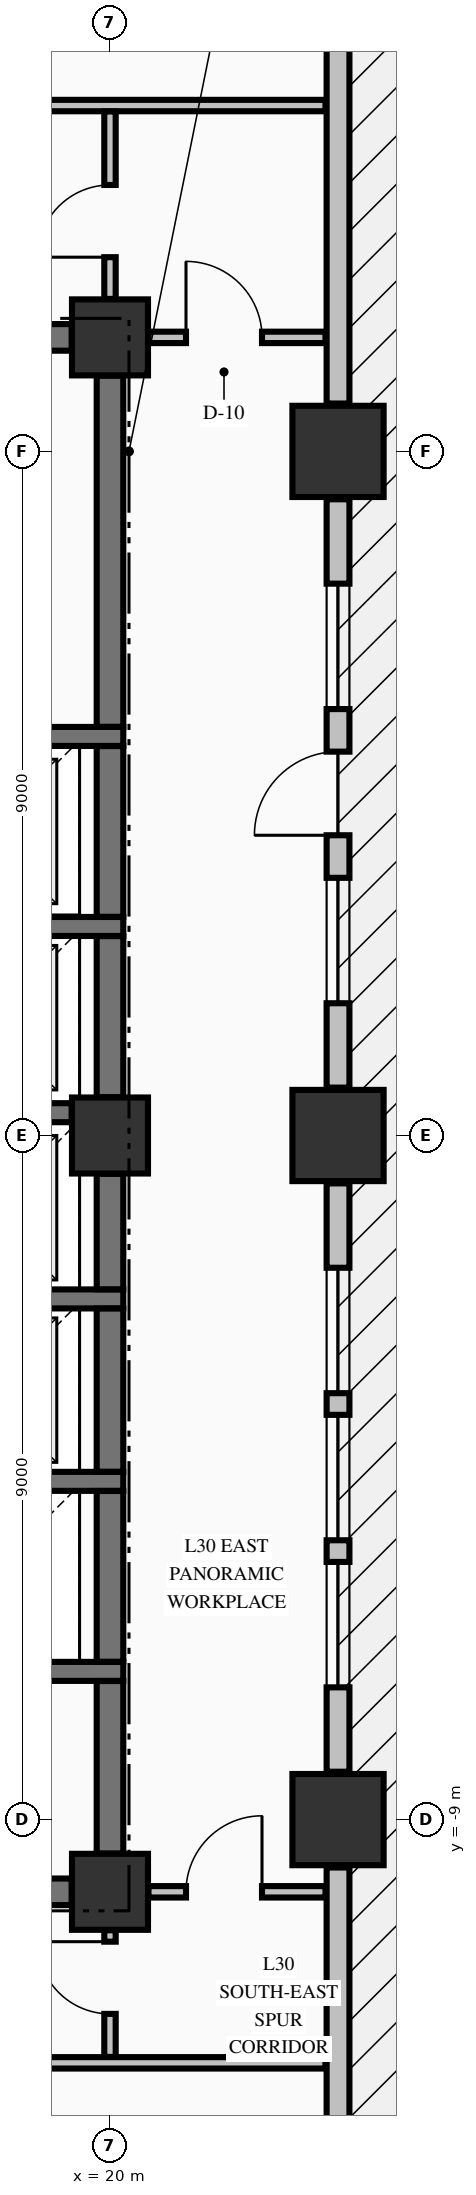
"""IFC4 building model, lengths in metres.
Left out: names, types, materials, properties, quantities, classifications, styles, units other than length and angle.
Written with IfcOpenShell. Run it as: python <this file> out.ifc"""

import sys

from ifc_helpers import new_model, si_unit, direction, frame, frame_2d, origin, origin_2d, place, context, subcontext, project, spatial, rectangle, extrude, element, fill, save


model = new_model("IFC4")
c1 = context("Model", 3, precision=1e-05, world=origin(), true_north=direction((0.0, 1.0)))
c2 = subcontext(c1, "Body", "Model", "MODEL_VIEW")
j1 = project(units=[si_unit("LENGTHUNIT", "METRE"), si_unit("PLANEANGLEUNIT", "RADIAN")], contexts=[c1])
p1 = place(None, origin())
s1 = spatial("IfcSite", under=j1, at=p1, CompositionType="ELEMENT")
p2 = place(p1, origin())
s2 = spatial("IfcBuilding", under=s1, at=p2, CompositionType="ELEMENT")
p3 = place(p2, frame((0.0, 0.0, 121.35)))
s3 = spatial("IfcBuildingStorey", under=s2, at=p3, CompositionType="ELEMENT", Elevation=121.35)
for number, where, z_axis, x_axis in (
    (1, (23.0, -9.0, -0.425), (0.0, 0.0, 1.0), (1.0, 0.0, 0.0)),
    (2, (23.0, 0.0, -0.425), (0.0, 0.0, 1.0), (1.0, 0.0, 0.0)),
    (3, (23.0, 9.0, -0.425), (0.0, 0.0, 1.0), (1.0, 0.0, 0.0)),
):
    element("IfcColumn", number, at=place(p3, frame(where, z_axis=z_axis, x_axis=x_axis)), inside=s3, PredefinedType="COLUMN", context=c2, shape_type="SweptSolid", body=[
        extrude(rectangle(XDim=1.2, YDim=1.2, at=origin_2d()), origin(), (0.0, 0.0, 1.0), 3.745),
    ])
for number, where, z_axis, x_axis in (
    (4, (20.0, -9.95, -0.425), (0.0, 0.0, 1.0), (1.0, 0.0, 0.0)),
    (5, (20.0, 10.5, -0.425), (0.0, 0.0, 1.0), (1.0, 0.0, 0.0)),
    (6, (20.0, 0.0, -0.425), (0.0, 0.0, 1.0), (1.0, 0.0, 0.0)),
):
    element("IfcColumn", number, at=place(p3, frame(where, z_axis=z_axis, x_axis=x_axis)), inside=s3, PredefinedType="COLUMN", context=c2, shape_type="SweptSolid", body=[
        extrude(rectangle(XDim=1.0, YDim=1.0, at=origin_2d()), origin(), (0.0, 0.0, 1.0), 3.745),
    ])
p4 = place(p3, frame((23.0, -20.37, 0.0), z_axis=(0.0, 0.0, 1.0), x_axis=(0.0, 1.0, 0.0)))
e7 = element("IfcWall", 7, at=p4, inside=s3, PredefinedType="STANDARD", context=c2, shape_type="SweptSolid", body=[
    extrude(rectangle(XDim=10.74, YDim=0.3, at=frame_2d((5.37, 0.0))), origin(), (0.0, 0.0, 1.0), 2.712),
])
p5 = place(p3, frame((23.0, -8.37, 0.0), z_axis=(0.0, 0.0, 1.0), x_axis=(0.0, 1.0, 0.0)))
e8 = element("IfcWall", 8, at=p5, inside=s3, PredefinedType="STANDARD", context=c2, shape_type="SweptSolid", body=[
    extrude(rectangle(XDim=7.74, YDim=0.3, at=frame_2d((3.87, 0.0))), origin(), (0.0, 0.0, 1.0), 2.712),
])
p6 = place(p5, frame((1.11, 0.0, 0.8)))
e9 = element("IfcOpeningElement", 9, at=p6, cuts=e8, PredefinedType="OPENING", context=c2, shape_type="SweptSolid", body=[
    extrude(rectangle(XDim=1.65, YDim=1.7, at=frame_2d((0.825, 0.85))), frame((0.0, 0.16, 0.0), z_axis=(0.0, -1.0, 0.0), x_axis=(1.0, 0.0, 0.0)), (0.0, 0.0, 1.0), 0.32),
])
p7 = place(p5, frame((3.045, 0.0, 0.8)))
e10 = element("IfcOpeningElement", 10, at=p7, cuts=e8, PredefinedType="OPENING", context=c2, shape_type="SweptSolid", body=[
    extrude(rectangle(XDim=1.65, YDim=1.7, at=frame_2d((0.825, 0.85))), frame((0.0, 0.16, 0.0), z_axis=(0.0, -1.0, 0.0), x_axis=(1.0, 0.0, 0.0)), (0.0, 0.0, 1.0), 0.32),
])
p8 = place(p5, frame((4.98, 0.0, 0.8)))
e11 = element("IfcOpeningElement", 11, at=p8, cuts=e8, PredefinedType="OPENING", context=c2, shape_type="SweptSolid", body=[
    extrude(rectangle(XDim=1.65, YDim=1.7, at=frame_2d((0.825, 0.85))), frame((0.0, 0.16, 0.0), z_axis=(0.0, -1.0, 0.0), x_axis=(1.0, 0.0, 0.0)), (0.0, 0.0, 1.0), 0.32),
])
p9 = place(p3, frame((23.0, 0.63, 0.0), z_axis=(0.0, 0.0, 1.0), x_axis=(0.0, 1.0, 0.0)))
e12 = element("IfcWall", 12, at=p9, inside=s3, PredefinedType="STANDARD", context=c2, shape_type="SweptSolid", body=[
    extrude(rectangle(XDim=7.74, YDim=0.3, at=frame_2d((3.87, 0.0))), origin(), (0.0, 0.0, 1.0), 2.712),
])
p10 = place(p9, frame((3.32, 0.0, 0.0)))
e13 = element("IfcOpeningElement", 13, at=p10, cuts=e12, PredefinedType="OPENING", context=c2, shape_type="SweptSolid", body=[
    extrude(rectangle(XDim=1.1, YDim=2.15, at=frame_2d((0.55, 1.075))), frame((0.0, 0.16, 0.0), z_axis=(0.0, -1.0, 0.0), x_axis=(1.0, 0.0, 0.0)), (0.0, 0.0, 1.0), 0.32),
])
p11 = place(p9, frame((1.11, 0.0, 0.8)))
e14 = element("IfcOpeningElement", 14, at=p11, cuts=e12, PredefinedType="OPENING", context=c2, shape_type="SweptSolid", body=[
    extrude(rectangle(XDim=1.65, YDim=1.7, at=frame_2d((0.825, 0.85))), frame((0.0, 0.16, 0.0), z_axis=(0.0, -1.0, 0.0), x_axis=(1.0, 0.0, 0.0)), (0.0, 0.0, 1.0), 0.32),
])
p12 = place(p9, frame((4.98, 0.0, 0.8)))
e15 = element("IfcOpeningElement", 15, at=p12, cuts=e12, PredefinedType="OPENING", context=c2, shape_type="SweptSolid", body=[
    extrude(rectangle(XDim=1.65, YDim=1.7, at=frame_2d((0.825, 0.85))), frame((0.0, 0.16, 0.0), z_axis=(0.0, -1.0, 0.0), x_axis=(1.0, 0.0, 0.0)), (0.0, 0.0, 1.0), 0.32),
])
p13 = place(p3, frame((23.0, 9.63, 0.0), z_axis=(0.0, 0.0, 1.0), x_axis=(0.0, 1.0, 0.0)))
e16 = element("IfcWall", 16, at=p13, inside=s3, PredefinedType="STANDARD", context=c2, shape_type="SweptSolid", body=[
    extrude(rectangle(XDim=10.74, YDim=0.3, at=frame_2d((5.37, 0.0))), origin(), (0.0, 0.0, 1.0), 2.712),
])
p14 = place(p3, frame((14.7, -9.95, 0.0), z_axis=(0.0, 0.0, 1.0), x_axis=(1.0, 0.0, 0.0)))
e17 = element("IfcWall", 17, at=p14, inside=s3, PredefinedType="SHEAR", context=c2, shape_type="SweptSolid", body=[
    extrude(rectangle(XDim=4.796, YDim=0.35, at=frame_2d((2.398, 0.0))), origin(), (0.0, 0.0, 1.0), 3.32),
])
p15 = place(p14, frame((0.65, 0.0, 0.0)))
e18 = element("IfcOpeningElement", 18, at=p15, cuts=e17, PredefinedType="OPENING", context=c2, shape_type="SweptSolid", body=[
    extrude(rectangle(XDim=1.2, YDim=2.15, at=frame_2d((0.6, 1.075))), frame((0.0, 0.185, 0.0), z_axis=(0.0, -1.0, 0.0), x_axis=(1.0, 0.0, 0.0)), (0.0, 0.0, 1.0), 0.37),
])
for number, where, z_axis, x_axis in (
    (19, (17.025, -7.05, 0.0), (0.0, 0.0, 1.0), (1.0, 0.0, 0.0)),
    (20, (17.025, -4.55, 0.0), (0.0, 0.0, 1.0), (1.0, 0.0, 0.0)),
    (21, (17.025, -2.15, 0.0), (0.0, 0.0, 1.0), (1.0, 0.0, 0.0)),
):
    element("IfcWall", number, at=place(p3, frame(where, z_axis=z_axis, x_axis=x_axis)), inside=s3, PredefinedType="SOLIDWALL", context=c2, shape_type="SweptSolid", body=[
        extrude(rectangle(XDim=3.15, YDim=0.25, at=frame_2d((1.575, 0.0))), origin(), (0.0, 0.0, 1.0), 3.32),
    ])
p16 = place(p3, frame((17.025, 0.3, 0.0), z_axis=(0.0, 0.0, 1.0), x_axis=(1.0, 0.0, 0.0)))
e22 = element("IfcWall", 22, at=p16, inside=s3, PredefinedType="SOLIDWALL", context=c2, shape_type="SweptSolid", body=[
    extrude(rectangle(XDim=2.471, YDim=0.25, at=frame_2d((1.236, 0.0))), origin(), (0.0, 0.0, 1.0), 3.32),
])
for number, where, z_axis, x_axis in (
    (23, (17.025, 2.75, 0.0), (0.0, 0.0, 1.0), (1.0, 0.0, 0.0)),
    (24, (17.025, 5.25, 0.0), (0.0, 0.0, 1.0), (1.0, 0.0, 0.0)),
):
    element("IfcWall", number, at=place(p3, frame(where, z_axis=z_axis, x_axis=x_axis)), inside=s3, PredefinedType="SOLIDWALL", context=c2, shape_type="SweptSolid", body=[
        extrude(rectangle(XDim=3.15, YDim=0.25, at=frame_2d((1.575, 0.0))), origin(), (0.0, 0.0, 1.0), 3.32),
    ])
p17 = place(p3, frame((14.7, 10.5, 0.0), z_axis=(0.0, 0.0, 1.0), x_axis=(1.0, 0.0, 0.0)))
e25 = element("IfcWall", 25, at=p17, inside=s3, PredefinedType="SHEAR", context=c2, shape_type="SweptSolid", body=[
    extrude(rectangle(XDim=4.796, YDim=0.35, at=frame_2d((2.398, 0.0))), origin(), (0.0, 0.0, 1.0), 3.32),
])
p18 = place(p17, frame((0.65, 0.0, 0.0)))
e26 = element("IfcOpeningElement", 26, at=p18, cuts=e25, PredefinedType="OPENING", context=c2, shape_type="SweptSolid", body=[
    extrude(rectangle(XDim=1.2, YDim=2.15, at=frame_2d((0.6, 1.075))), frame((0.0, 0.185, 0.0), z_axis=(0.0, -1.0, 0.0), x_axis=(1.0, 0.0, 0.0)), (0.0, 0.0, 1.0), 0.37),
])
p19 = place(p17, frame((3.25, 0.0, 0.0)))
e27 = element("IfcOpeningElement", 27, at=p19, cuts=e25, PredefinedType="OPENING", context=c2, shape_type="SweptSolid", body=[
    extrude(rectangle(XDim=0.9, YDim=2.15, at=frame_2d((0.45, 1.075))), frame((0.0, 0.185, 0.0), z_axis=(0.0, -1.0, 0.0), x_axis=(1.0, 0.0, 0.0)), (0.0, 0.0, 1.0), 0.37),
])
p20 = place(p3, frame((-27.835, -12.2, 0.0), z_axis=(0.0, 0.0, 1.0), x_axis=(1.0, 0.0, 0.0)))
e28 = element("IfcWall", 28, at=p20, inside=s3, PredefinedType="PARTITIONING", context=c2, shape_type="SweptSolid", body=[
    extrude(rectangle(XDim=50.67, YDim=0.15, at=frame_2d((25.335, 0.0))), origin(), (0.0, 0.0, 1.0), 3.32),
])
p21 = place(p20, frame((13.13, 0.0, 0.0)))
e29 = element("IfcOpeningElement", 29, at=p21, cuts=e28, PredefinedType="OPENING", context=c2, shape_type="SweptSolid", body=[
    extrude(rectangle(XDim=1.05, YDim=2.15, at=frame_2d((0.525, 1.075))), frame((0.0, 0.085, 0.0), z_axis=(0.0, -1.0, 0.0), x_axis=(1.0, 0.0, 0.0)), (0.0, 0.0, 1.0), 0.17),
])
p22 = place(p20, frame((24.26, 0.0, 0.0)))
e30 = element("IfcOpeningElement", 30, at=p22, cuts=e28, PredefinedType="OPENING", context=c2, shape_type="SweptSolid", body=[
    extrude(rectangle(XDim=1.05, YDim=2.15, at=frame_2d((0.525, 1.075))), frame((0.0, 0.085, 0.0), z_axis=(0.0, -1.0, 0.0), x_axis=(1.0, 0.0, 0.0)), (0.0, 0.0, 1.0), 0.17),
])
p23 = place(p20, frame((44.16, 0.0, 0.0)))
e31 = element("IfcOpeningElement", 31, at=p23, cuts=e28, PredefinedType="OPENING", context=c2, shape_type="SweptSolid", body=[
    extrude(rectangle(XDim=1.05, YDim=2.15, at=frame_2d((0.525, 1.075))), frame((0.0, 0.085, 0.0), z_axis=(0.0, -1.0, 0.0), x_axis=(1.0, 0.0, 0.0)), (0.0, 0.0, 1.0), 0.17),
])
p24 = place(p3, frame((20.506, -9.95, 0.0), z_axis=(0.0, 0.0, 1.0), x_axis=(1.0, 0.0, 0.0)))
e32 = element("IfcWall", 32, at=p24, inside=s3, PredefinedType="PARTITIONING", context=c2, shape_type="SweptSolid", body=[
    extrude(rectangle(XDim=2.329, YDim=0.15, at=frame_2d((1.165, 0.0))), origin(), (0.0, 0.0, 1.0), 3.32),
])
p25 = place(p24, frame((0.494, 0.0, 0.0)))
e33 = element("IfcOpeningElement", 33, at=p25, cuts=e32, PredefinedType="OPENING", context=c2, shape_type="SweptSolid", body=[
    extrude(rectangle(XDim=1.0, YDim=2.15, at=frame_2d((0.5, 1.075))), frame((0.0, 0.085, 0.0), z_axis=(0.0, -1.0, 0.0), x_axis=(1.0, 0.0, 0.0)), (0.0, 0.0, 1.0), 0.17),
])
p26 = place(p3, frame((20.506, 10.5, 0.0), z_axis=(0.0, 0.0, 1.0), x_axis=(1.0, 0.0, 0.0)))
e34 = element("IfcWall", 34, at=p26, inside=s3, PredefinedType="PARTITIONING", context=c2, shape_type="SweptSolid", body=[
    extrude(rectangle(XDim=2.329, YDim=0.15, at=frame_2d((1.165, 0.0))), origin(), (0.0, 0.0, 1.0), 3.32),
])
p27 = place(p26, frame((0.494, 0.0, 0.0)))
e35 = element("IfcOpeningElement", 35, at=p27, cuts=e34, PredefinedType="OPENING", context=c2, shape_type="SweptSolid", body=[
    extrude(rectangle(XDim=1.0, YDim=2.15, at=frame_2d((0.5, 1.075))), frame((0.0, 0.085, 0.0), z_axis=(0.0, -1.0, 0.0), x_axis=(1.0, 0.0, 0.0)), (0.0, 0.0, 1.0), 0.17),
])
p28 = place(p3, frame((-27.835, 13.55, 0.0), z_axis=(0.0, 0.0, 1.0), x_axis=(1.0, 0.0, 0.0)))
e36 = element("IfcWall", 36, at=p28, inside=s3, PredefinedType="PARTITIONING", context=c2, shape_type="SweptSolid", body=[
    extrude(rectangle(XDim=50.67, YDim=0.15, at=frame_2d((25.335, 0.0))), origin(), (0.0, 0.0, 1.0), 3.32),
])
p29 = place(p28, frame((10.51, 0.0, 0.0)))
e37 = element("IfcOpeningElement", 37, at=p29, cuts=e36, PredefinedType="OPENING", context=c2, shape_type="SweptSolid", body=[
    extrude(rectangle(XDim=1.05, YDim=2.15, at=frame_2d((0.525, 1.075))), frame((0.0, 0.085, 0.0), z_axis=(0.0, -1.0, 0.0), x_axis=(1.0, 0.0, 0.0)), (0.0, 0.0, 1.0), 0.17),
])
p30 = place(p28, frame((15.16, 0.0, 0.0)))
e38 = element("IfcOpeningElement", 38, at=p30, cuts=e36, PredefinedType="OPENING", context=c2, shape_type="SweptSolid", body=[
    extrude(rectangle(XDim=1.05, YDim=2.15, at=frame_2d((0.525, 1.075))), frame((0.0, 0.085, 0.0), z_axis=(0.0, -1.0, 0.0), x_axis=(1.0, 0.0, 0.0)), (0.0, 0.0, 1.0), 0.17),
])
p31 = place(p28, frame((24.91, 0.0, 0.0)))
e39 = element("IfcOpeningElement", 39, at=p31, cuts=e36, PredefinedType="OPENING", context=c2, shape_type="SweptSolid", body=[
    extrude(rectangle(XDim=1.05, YDim=2.15, at=frame_2d((0.525, 1.075))), frame((0.0, 0.085, 0.0), z_axis=(0.0, -1.0, 0.0), x_axis=(1.0, 0.0, 0.0)), (0.0, 0.0, 1.0), 0.17),
])
p32 = place(p28, frame((32.81, 0.0, 0.0)))
e40 = element("IfcOpeningElement", 40, at=p32, cuts=e36, PredefinedType="OPENING", context=c2, shape_type="SweptSolid", body=[
    extrude(rectangle(XDim=1.05, YDim=2.15, at=frame_2d((0.525, 1.075))), frame((0.0, 0.085, 0.0), z_axis=(0.0, -1.0, 0.0), x_axis=(1.0, 0.0, 0.0)), (0.0, 0.0, 1.0), 0.17),
])
p33 = place(p28, frame((41.36, 0.0, 0.0)))
e41 = element("IfcOpeningElement", 41, at=p33, cuts=e36, PredefinedType="OPENING", context=c2, shape_type="SweptSolid", body=[
    extrude(rectangle(XDim=1.05, YDim=2.15, at=frame_2d((0.525, 1.075))), frame((0.0, 0.085, 0.0), z_axis=(0.0, -1.0, 0.0), x_axis=(1.0, 0.0, 0.0)), (0.0, 0.0, 1.0), 0.17),
])
p34 = place(p3, frame((20.0, -9.446, 0.0), z_axis=(0.0, 0.0, 1.0), x_axis=(0.0, 1.0, 0.0)))
e42 = element("IfcWall", 42, at=p34, inside=s3, PredefinedType="SHEAR", context=c2, shape_type="SweptSolid", body=[
    extrude(rectangle(XDim=2.269, YDim=0.35, at=frame_2d((1.135, 0.0))), origin(), (0.0, 0.0, 1.0), 3.32),
])
p35 = place(p3, frame((20.0, -6.923, 0.0), z_axis=(0.0, 0.0, 1.0), x_axis=(0.0, 1.0, 0.0)))
e43 = element("IfcWall", 43, at=p35, inside=s3, PredefinedType="SHEAR", context=c2, shape_type="SweptSolid", body=[
    extrude(rectangle(XDim=2.246, YDim=0.35, at=frame_2d((1.123, 0.0))), origin(), (0.0, 0.0, 1.0), 3.32),
])
p36 = place(p3, frame((20.0, -4.423, 0.0), z_axis=(0.0, 0.0, 1.0), x_axis=(0.0, 1.0, 0.0)))
e44 = element("IfcWall", 44, at=p36, inside=s3, PredefinedType="SHEAR", context=c2, shape_type="SweptSolid", body=[
    extrude(rectangle(XDim=2.146, YDim=0.35, at=frame_2d((1.073, 0.0))), origin(), (0.0, 0.0, 1.0), 3.32),
])
p37 = place(p3, frame((20.0, -2.023, 0.0), z_axis=(0.0, 0.0, 1.0), x_axis=(0.0, 1.0, 0.0)))
e45 = element("IfcWall", 45, at=p37, inside=s3, PredefinedType="SHEAR", context=c2, shape_type="SweptSolid", body=[
    extrude(rectangle(XDim=1.519, YDim=0.35, at=frame_2d((0.76, 0.0))), origin(), (0.0, 0.0, 1.0), 3.32),
])
p38 = place(p3, frame((20.0, 0.504, 0.0), z_axis=(0.0, 0.0, 1.0), x_axis=(0.0, 1.0, 0.0)))
e46 = element("IfcWall", 46, at=p38, inside=s3, PredefinedType="SHEAR", context=c2, shape_type="SweptSolid", body=[
    extrude(rectangle(XDim=2.119, YDim=0.35, at=frame_2d((1.06, 0.0))), origin(), (0.0, 0.0, 1.0), 3.32),
])
p39 = place(p3, frame((20.0, 2.877, 0.0), z_axis=(0.0, 0.0, 1.0), x_axis=(0.0, 1.0, 0.0)))
e47 = element("IfcWall", 47, at=p39, inside=s3, PredefinedType="SHEAR", context=c2, shape_type="SweptSolid", body=[
    extrude(rectangle(XDim=2.246, YDim=0.35, at=frame_2d((1.123, 0.0))), origin(), (0.0, 0.0, 1.0), 3.32),
])
p40 = place(p3, frame((20.0, 5.377, 0.0), z_axis=(0.0, 0.0, 1.0), x_axis=(0.0, 1.0, 0.0)))
e48 = element("IfcWall", 48, at=p40, inside=s3, PredefinedType="SHEAR", context=c2, shape_type="SweptSolid", body=[
    extrude(rectangle(XDim=4.619, YDim=0.35, at=frame_2d((2.31, 0.0))), origin(), (0.0, 0.0, 1.0), 3.32),
])
p41 = place(p3, frame((20.0, -12.122, 0.0), z_axis=(0.0, 0.0, 1.0), x_axis=(0.0, 1.0, 0.0)))
e49 = element("IfcWall", 49, at=p41, inside=s3, PredefinedType="PARTITIONING", context=c2, shape_type="SweptSolid", body=[
    extrude(rectangle(XDim=1.666, YDim=0.15, at=frame_2d((0.833, 0.0))), origin(), (0.0, 0.0, 1.0), 2.81),
])
p42 = place(p41, frame((0.566, 0.0, 0.0)))
e50 = element("IfcOpeningElement", 50, at=p42, cuts=e49, PredefinedType="OPENING", context=c2, shape_type="SweptSolid", body=[
    extrude(rectangle(XDim=0.95, YDim=2.15, at=frame_2d((0.475, 1.075))), frame((0.0, 0.085, 0.0), z_axis=(0.0, -1.0, 0.0), x_axis=(1.0, 0.0, 0.0)), (0.0, 0.0, 1.0), 0.17),
])
p43 = place(p3, frame((20.0, 11.006, 0.0), z_axis=(0.0, 0.0, 1.0), x_axis=(0.0, 1.0, 0.0)))
e51 = element("IfcWall", 51, at=p43, inside=s3, PredefinedType="PARTITIONING", context=c2, shape_type="SweptSolid", body=[
    extrude(rectangle(XDim=2.466, YDim=0.15, at=frame_2d((1.233, 0.0))), origin(), (0.0, 0.0, 1.0), 2.81),
])
p44 = place(p43, frame((0.549, 0.0, 0.0)))
e52 = element("IfcOpeningElement", 52, at=p44, cuts=e51, PredefinedType="OPENING", context=c2, shape_type="SweptSolid", body=[
    extrude(rectangle(XDim=0.95, YDim=2.15, at=frame_2d((0.475, 1.075))), frame((0.0, 0.085, 0.0), z_axis=(0.0, -1.0, 0.0), x_axis=(1.0, 0.0, 0.0)), (0.0, 0.0, 1.0), 0.17),
])
p45 = place(p6, origin())
e53 = element("IfcWindow", 53, at=p45, inside=s3, PartitioningType="SINGLE_PANEL", PredefinedType="WINDOW", context=c2, shape_type="SweptSolid", body=[
    extrude(rectangle(XDim=1.65, YDim=1.7, at=frame_2d((0.825, 0.85))), frame((0.0, 0.03, 0.0), z_axis=(0.0, -1.0, 0.0), x_axis=(1.0, 0.0, 0.0)), (0.0, 0.0, 1.0), 0.06),
])
fill(e9, e53)
p46 = place(p7, origin())
e54 = element("IfcWindow", 54, at=p46, inside=s3, PartitioningType="SINGLE_PANEL", PredefinedType="WINDOW", context=c2, shape_type="SweptSolid", body=[
    extrude(rectangle(XDim=1.65, YDim=1.7, at=frame_2d((0.825, 0.85))), frame((0.0, 0.03, 0.0), z_axis=(0.0, -1.0, 0.0), x_axis=(1.0, 0.0, 0.0)), (0.0, 0.0, 1.0), 0.06),
])
fill(e10, e54)
p47 = place(p8, origin())
e55 = element("IfcWindow", 55, at=p47, inside=s3, PartitioningType="SINGLE_PANEL", PredefinedType="WINDOW", context=c2, shape_type="SweptSolid", body=[
    extrude(rectangle(XDim=1.65, YDim=1.7, at=frame_2d((0.825, 0.85))), frame((0.0, 0.03, 0.0), z_axis=(0.0, -1.0, 0.0), x_axis=(1.0, 0.0, 0.0)), (0.0, 0.0, 1.0), 0.06),
])
fill(e11, e55)
p48 = place(p10, origin())
e56 = element("IfcDoor", 56, at=p48, inside=s3, OperationType="SINGLE_SWING_LEFT", PredefinedType="DOOR", context=c2, shape_type="SweptSolid", body=[
    extrude(rectangle(XDim=1.1, YDim=2.15, at=frame_2d((0.55, 1.075))), frame((0.0, 0.025, 0.0), z_axis=(0.0, -1.0, 0.0), x_axis=(1.0, 0.0, 0.0)), (0.0, 0.0, 1.0), 0.05),
])
fill(e13, e56)
p49 = place(p11, origin())
e57 = element("IfcWindow", 57, at=p49, inside=s3, PartitioningType="SINGLE_PANEL", PredefinedType="WINDOW", context=c2, shape_type="SweptSolid", body=[
    extrude(rectangle(XDim=1.65, YDim=1.7, at=frame_2d((0.825, 0.85))), frame((0.0, 0.03, 0.0), z_axis=(0.0, -1.0, 0.0), x_axis=(1.0, 0.0, 0.0)), (0.0, 0.0, 1.0), 0.06),
])
fill(e14, e57)
p50 = place(p12, origin())
e58 = element("IfcWindow", 58, at=p50, inside=s3, PartitioningType="SINGLE_PANEL", PredefinedType="WINDOW", context=c2, shape_type="SweptSolid", body=[
    extrude(rectangle(XDim=1.65, YDim=1.7, at=frame_2d((0.825, 0.85))), frame((0.0, 0.03, 0.0), z_axis=(0.0, -1.0, 0.0), x_axis=(1.0, 0.0, 0.0)), (0.0, 0.0, 1.0), 0.06),
])
fill(e15, e58)
p51 = place(p44, origin())
e59 = element("IfcDoor", 59, at=p51, inside=s3, OperationType="SINGLE_SWING_LEFT", PredefinedType="DOOR", context=c2, shape_type="SweptSolid", body=[
    extrude(rectangle(XDim=0.95, YDim=2.15, at=frame_2d((0.475, 1.075))), frame((0.0, 0.025, 0.0), z_axis=(0.0, -1.0, 0.0), x_axis=(1.0, 0.0, 0.0)), (0.0, 0.0, 1.0), 0.05),
])
fill(e52, e59)
p52 = place(p42, origin())
e60 = element("IfcDoor", 60, at=p52, inside=s3, OperationType="SINGLE_SWING_RIGHT", PredefinedType="DOOR", context=c2, shape_type="SweptSolid", body=[
    extrude(rectangle(XDim=0.95, YDim=2.15, at=frame_2d((0.475, 1.075))), frame((0.0, 0.025, 0.0), z_axis=(0.0, -1.0, 0.0), x_axis=(1.0, 0.0, 0.0)), (0.0, 0.0, 1.0), 0.05),
])
fill(e50, e60)
p53 = place(p27, origin())
e61 = element("IfcDoor", 61, at=p53, inside=s3, OperationType="SINGLE_SWING_LEFT", PredefinedType="DOOR", context=c2, shape_type="SweptSolid", body=[
    extrude(rectangle(XDim=1.0, YDim=2.15, at=frame_2d((0.5, 1.075))), frame((0.0, 0.025, 0.0), z_axis=(0.0, -1.0, 0.0), x_axis=(1.0, 0.0, 0.0)), (0.0, 0.0, 1.0), 0.05),
])
fill(e35, e61)
p54 = place(p25, origin())
e62 = element("IfcDoor", 62, at=p54, inside=s3, OperationType="SINGLE_SWING_RIGHT", PredefinedType="DOOR", context=c2, shape_type="SweptSolid", body=[
    extrude(rectangle(XDim=1.0, YDim=2.15, at=frame_2d((0.5, 1.075))), frame((0.0, 0.025, 0.0), z_axis=(0.0, -1.0, 0.0), x_axis=(1.0, 0.0, 0.0)), (0.0, 0.0, 1.0), 0.05),
])
fill(e33, e62)
save(model, sys.argv[1])
